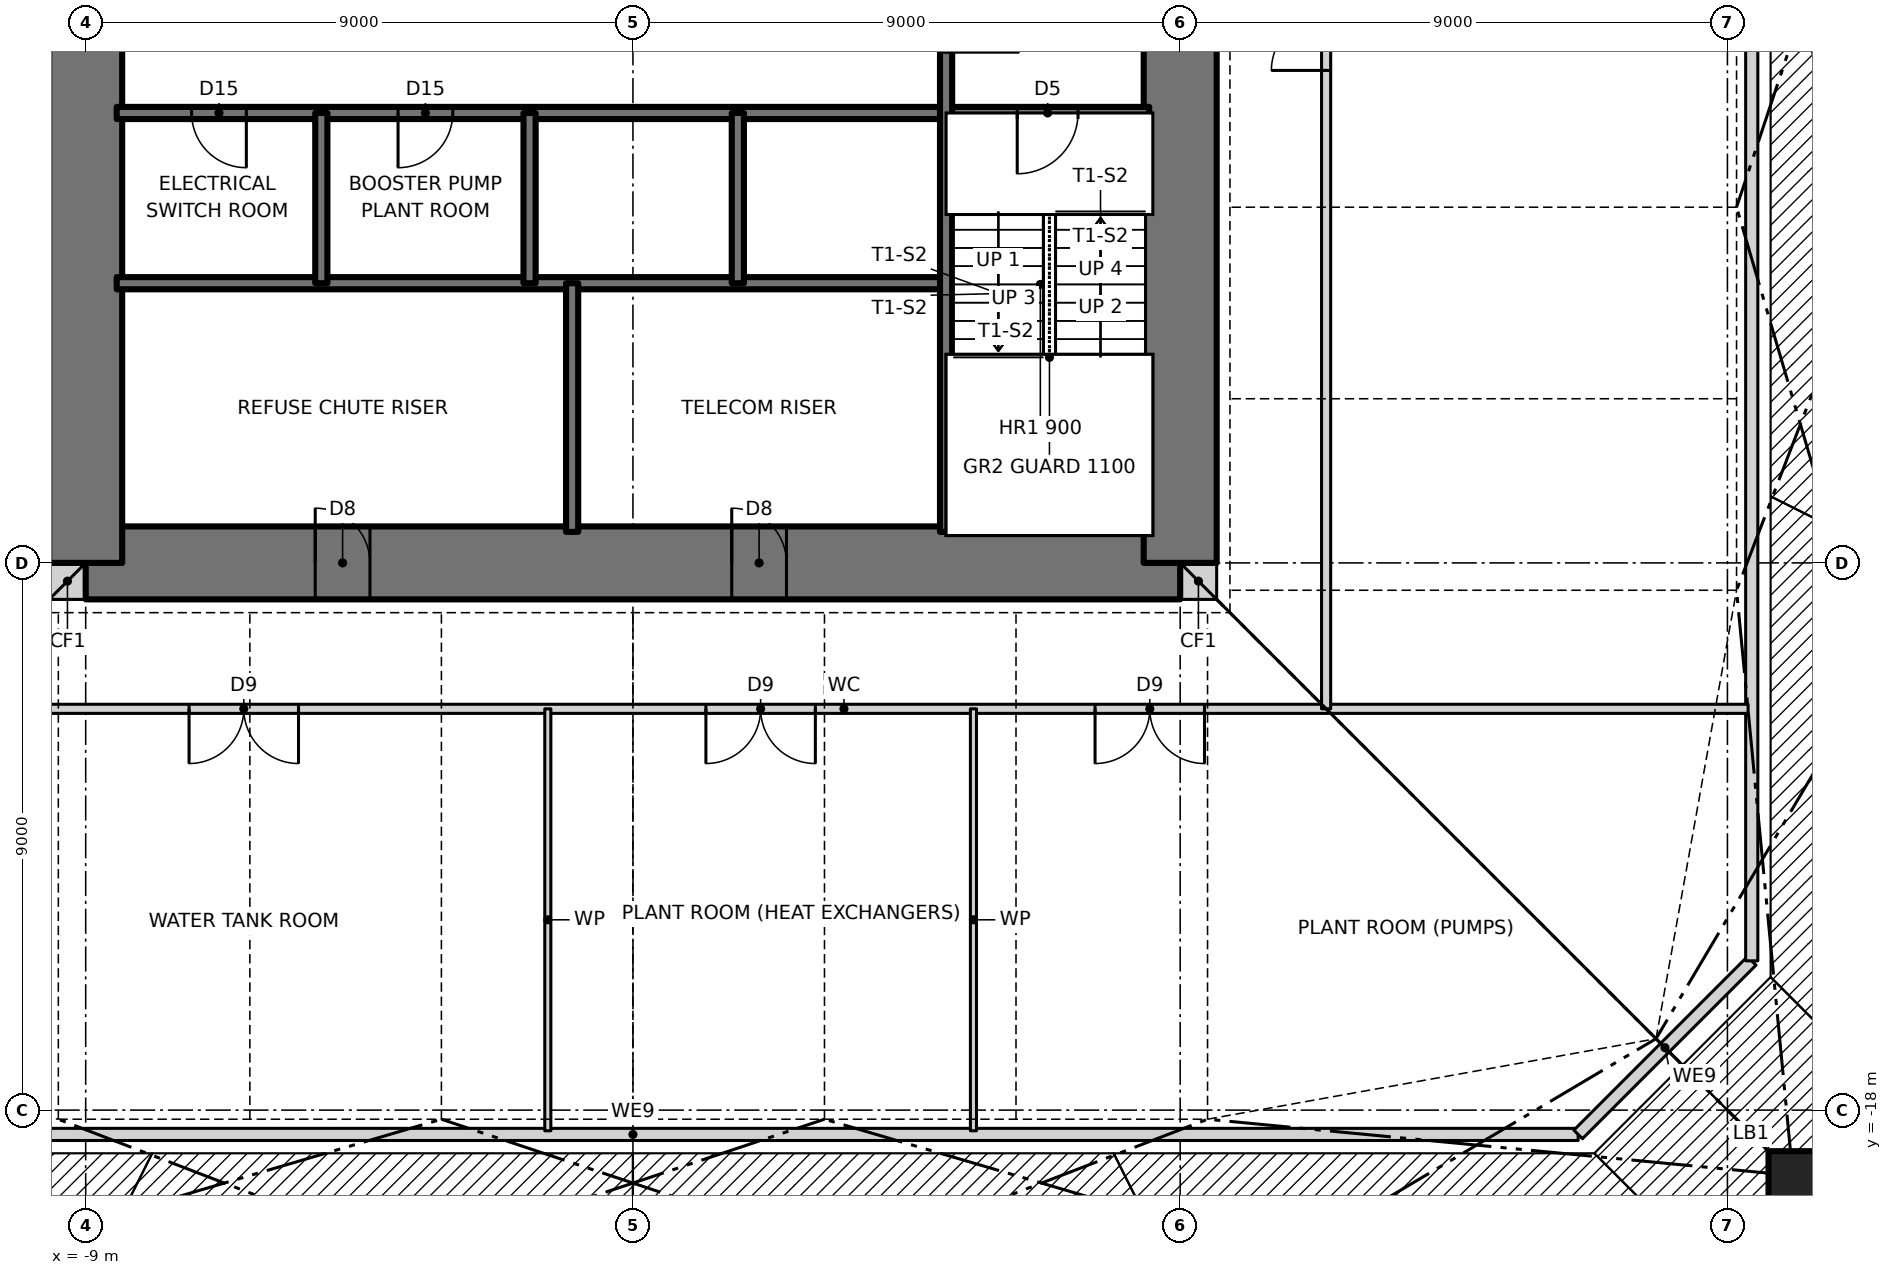
"""IFC4 building model, lengths in metres.
Left out: names, types, materials, properties, quantities, classifications, styles, units other than length and angle.
Written with IfcOpenShell. Run it as: python <this file> out.ifc"""

import sys

from ifc_helpers import new_model, si_unit, direction, frame, frame_2d, origin, origin_2d, place, context, subcontext, project, spatial, rectangle, hollow_rectangle, extrude, clip, halfspace, element, fill, save


model = new_model("IFC4")
c1 = context("Model", 3, precision=1e-05, world=origin(), true_north=direction((0.0, 1.0)))
c2 = subcontext(c1, "Body", "Model", "MODEL_VIEW")
j1 = project(units=[si_unit("LENGTHUNIT", "METRE"), si_unit("PLANEANGLEUNIT", "RADIAN")], contexts=[c1])
p1 = place(None, origin())
s1 = spatial("IfcSite", under=j1, at=p1, CompositionType="ELEMENT")
p2 = place(p1, origin())
s2 = spatial("IfcBuilding", under=s1, at=p2, CompositionType="ELEMENT")
p3 = place(p2, frame((0.0, 0.0, 143.5)))
s3 = spatial("IfcBuildingStorey", under=s2, at=p3, CompositionType="ELEMENT", Elevation=143.5)
p4 = place(p3, frame((-10.8, -20.4, 0.0), z_axis=(0.206163197348, 0.343580475001, 0.916214600002), x_axis=(-0.857476506072, 0.514523120505, 0.0)))
e1 = element("IfcColumn", 1, at=p4, inside=s3, PredefinedType="COLUMN", context=c2, shape_type="Clipping", body=[
    clip(clip(extrude(hollow_rectangle(XDim=0.8, YDim=0.8, WallThickness=0.07, at=origin_2d()), origin(), (0.0, 0.0, 1.0), 6.549), halfspace(frame((0.0, 0.0, 0.0), z_axis=(0.0, -0.400687916891, -0.916214600002), x_axis=(-0.857476506072, -0.471413595046, 0.206163197348)), False)), halfspace(frame((0.0, 2.404, 5.497), z_axis=(0.0, 0.400687916891, 0.916214600002), x_axis=(-0.857476506072, -0.471413595046, 0.206163197348)), False)),
])
p5 = place(p3, frame((-3.6, -20.4, 0.0), z_axis=(0.07008242466, 0.350260100688, 0.934026935168), x_axis=(-0.980564303347, 0.196197979098, 0.0)))
e2 = element("IfcColumn", 2, at=p5, inside=s3, PredefinedType="COLUMN", context=c2, shape_type="Clipping", body=[
    clip(clip(extrude(hollow_rectangle(XDim=0.8, YDim=0.8, WallThickness=0.07, at=origin_2d()), origin(), (0.0, 0.0, 1.0), 6.424), halfspace(frame((0.0, 0.0, 0.0), z_axis=(0.0, -0.35720258171, -0.934026935168), x_axis=(-0.980564303347, -0.183254197104, 0.07008242466)), False)), halfspace(frame((0.0, 2.143, 5.604), z_axis=(0.0, 0.35720258171, 0.934026935168), x_axis=(-0.980564303347, -0.183254197104, 0.07008242466)), False)),
])
p6 = place(p3, frame((3.6, -20.4, 0.0), z_axis=(-0.07008242466, 0.350260100688, 0.934026935168), x_axis=(-0.980564303347, -0.196197979098, 0.0)))
e3 = element("IfcColumn", 3, at=p6, inside=s3, PredefinedType="COLUMN", context=c2, shape_type="Clipping", body=[
    clip(clip(extrude(hollow_rectangle(XDim=0.8, YDim=0.8, WallThickness=0.07, at=origin_2d()), origin(), (0.0, 0.0, 1.0), 6.424), halfspace(frame((0.0, 0.0, 0.0), z_axis=(0.0, -0.35720258171, -0.934026935168), x_axis=(-0.980564303347, 0.183254197104, -0.07008242466)), False)), halfspace(frame((0.0, 2.143, 5.604), z_axis=(0.0, 0.35720258171, 0.934026935168), x_axis=(-0.980564303347, 0.183254197104, -0.07008242466)), False)),
])
p7 = place(p3, frame((10.8, -20.4, 0.0), z_axis=(-0.206163197348, 0.343580475001, 0.916214600002), x_axis=(-0.857476506072, -0.514523120505, 0.0)))
e4 = element("IfcColumn", 4, at=p7, inside=s3, PredefinedType="COLUMN", context=c2, shape_type="Clipping", body=[
    clip(clip(extrude(hollow_rectangle(XDim=0.8, YDim=0.8, WallThickness=0.07, at=origin_2d()), origin(), (0.0, 0.0, 1.0), 6.549), halfspace(frame((0.0, 0.0, 0.0), z_axis=(0.0, -0.400687916891, -0.916214600002), x_axis=(-0.857476506072, 0.471413595046, -0.206163197348)), False)), halfspace(frame((0.0, 2.404, 5.497), z_axis=(0.0, 0.400687916891, 0.916214600002), x_axis=(-0.857476506072, 0.471413595046, -0.206163197348)), False)),
])
p8 = place(p3, frame((19.076, -19.076, 0.0), z_axis=(-0.331294578225, 0.331294578225, 0.883452208599), x_axis=(-0.707106781187, -0.707106781187, 0.0)))
e5 = element("IfcColumn", 5, at=p8, inside=s3, PredefinedType="COLUMN", context=c2, shape_type="Clipping", body=[
    clip(clip(extrude(hollow_rectangle(XDim=0.8, YDim=0.8, WallThickness=0.18, at=origin_2d()), origin(), (0.0, 0.0, 1.0), 6.792), halfspace(frame((0.0, 0.0, 0.0), z_axis=(0.0, -0.468521285666, -0.883452208599), x_axis=(-0.707106781187, 0.624695047554, -0.331294578225)), False)), halfspace(frame((0.0, 2.811, 5.301), z_axis=(0.0, 0.468521285666, 0.883452208599), x_axis=(-0.707106781187, 0.624695047554, -0.331294578225)), False)),
])
p9 = place(p3, frame((20.4, -10.8, 0.0), z_axis=(-0.343580475001, 0.206163197348, 0.916214600002), x_axis=(-0.514523120505, -0.857476506072, 0.0)))
e6 = element("IfcColumn", 6, at=p9, inside=s3, PredefinedType="COLUMN", context=c2, shape_type="Clipping", body=[
    clip(clip(extrude(hollow_rectangle(XDim=0.8, YDim=0.8, WallThickness=0.07, at=origin_2d()), origin(), (0.0, 0.0, 1.0), 6.549), halfspace(frame((0.0, 0.0, 0.0), z_axis=(0.0, -0.400687916891, -0.916214600002), x_axis=(-0.514523120505, 0.785632494022, -0.343580475001)), False)), halfspace(frame((0.0, 2.404, 5.497), z_axis=(0.0, 0.400687916891, 0.916214600002), x_axis=(-0.514523120505, 0.785632494022, -0.343580475001)), False)),
])
p10 = place(p3, frame((20.4, -3.6, 0.0), z_axis=(-0.350260100688, 0.07008242466, 0.934026935168), x_axis=(-0.196197979098, -0.980564303347, 0.0)))
e7 = element("IfcColumn", 7, at=p10, inside=s3, PredefinedType="COLUMN", context=c2, shape_type="Clipping", body=[
    clip(clip(extrude(hollow_rectangle(XDim=0.8, YDim=0.8, WallThickness=0.07, at=origin_2d()), origin(), (0.0, 0.0, 1.0), 6.424), halfspace(frame((0.0, 0.0, 0.0), z_axis=(0.0, -0.35720258171, -0.934026935168), x_axis=(-0.196197979098, 0.91587347099, -0.350260100688)), False)), halfspace(frame((0.0, 2.143, 5.604), z_axis=(0.0, 0.35720258171, 0.934026935168), x_axis=(-0.196197979098, 0.91587347099, -0.350260100688)), False)),
])
for number, where, z_axis, x_axis in (
    (8, (-9.6, -9.3, 0.0), (0.0, 0.0, 1.0), (1.0, 0.0, 0.0)),
    (9, (9.0, -9.3, 0.0), (0.0, 0.0, 1.0), (1.0, 0.0, 0.0)),
):
    element("IfcWall", number, at=place(p3, frame(where, z_axis=z_axis, x_axis=x_axis)), inside=s3, PredefinedType="SOLIDWALL", context=c2, shape_type="SweptSolid", body=[
        extrude(rectangle(XDim=0.6, YDim=0.6, at=frame_2d((0.3, 0.0))), origin(), (0.0, 0.0, 1.0), 6.0),
    ])
p11 = place(p3, frame((-9.0, -9.0, 0.0), z_axis=(0.0, 0.0, 1.0), x_axis=(1.0, 0.0, 0.0)))
e10 = element("IfcWall", 10, at=p11, inside=s3, PredefinedType="SHEAR", context=c2, shape_type="SweptSolid", body=[
    extrude(rectangle(XDim=18.0, YDim=1.2, at=frame_2d((9.0, 0.0))), origin(), (0.0, 0.0, 1.0), 6.0),
])
p12 = place(p11, frame((3.775, 0.0, 0.0)))
e11 = element("IfcOpeningElement", 11, at=p12, cuts=e10, PredefinedType="OPENING", context=c2, shape_type="SweptSolid", body=[
    extrude(rectangle(XDim=0.9, YDim=2.1, at=frame_2d((0.45, 1.05))), frame((0.0, 0.61, 0.0), z_axis=(0.0, -1.0, 0.0), x_axis=(1.0, 0.0, 0.0)), (0.0, 0.0, 1.0), 1.22),
])
p13 = place(p11, frame((10.625, 0.0, 0.0)))
e12 = element("IfcOpeningElement", 12, at=p13, cuts=e10, PredefinedType="OPENING", context=c2, shape_type="SweptSolid", body=[
    extrude(rectangle(XDim=0.9, YDim=2.1, at=frame_2d((0.45, 1.05))), frame((0.0, 0.61, 0.0), z_axis=(0.0, -1.0, 0.0), x_axis=(1.0, 0.0, 0.0)), (0.0, 0.0, 1.0), 1.22),
])
p14 = place(p3, frame((9.0, -9.0, 0.0), z_axis=(0.0, 0.0, 1.0), x_axis=(0.0, 1.0, 0.0)))
e13 = element("IfcWall", 13, at=p14, inside=s3, PredefinedType="SHEAR", context=c2, shape_type="SweptSolid", body=[
    extrude(rectangle(XDim=18.0, YDim=1.2, at=frame_2d((9.0, 0.0))), origin(), (0.0, 0.0, 1.0), 6.0),
])
p15 = place(p14, frame((8.5, 0.0, 0.0)))
e14 = element("IfcOpeningElement", 14, at=p15, cuts=e13, PredefinedType="OPENING", context=c2, shape_type="SweptSolid", body=[
    extrude(rectangle(XDim=1.0, YDim=2.1, at=frame_2d((0.5, 1.05))), frame((0.0, 0.61, 0.0), z_axis=(0.0, -1.0, 0.0), x_axis=(1.0, 0.0, 0.0)), (0.0, 0.0, 1.0), 1.22),
])
p16 = place(p3, frame((-9.0, 9.0, 0.0), z_axis=(0.0, 0.0, 1.0), x_axis=(0.0, -1.0, 0.0)))
e15 = element("IfcWall", 15, at=p16, inside=s3, PredefinedType="SHEAR", context=c2, shape_type="SweptSolid", body=[
    extrude(rectangle(XDim=18.0, YDim=1.2, at=frame_2d((9.0, 0.0))), origin(), (0.0, 0.0, 1.0), 6.0),
])
p17 = place(p16, frame((8.5, 0.0, 0.0)))
e16 = element("IfcOpeningElement", 16, at=p17, cuts=e15, PredefinedType="OPENING", context=c2, shape_type="SweptSolid", body=[
    extrude(rectangle(XDim=1.0, YDim=2.1, at=frame_2d((0.5, 1.05))), frame((0.0, 0.61, 0.0), z_axis=(0.0, -1.0, 0.0), x_axis=(1.0, 0.0, 0.0)), (0.0, 0.0, 1.0), 1.22),
])
p18 = place(p3, frame((-15.545, -18.4, 0.0), z_axis=(0.0, 0.0, 1.0), x_axis=(1.0, 0.0, 0.0)))
e17 = element("IfcWall", 17, at=p18, inside=s3, PredefinedType="PARTITIONING", context=c2, shape_type="SweptSolid", body=[
    extrude(rectangle(XDim=31.09, YDim=0.2, at=frame_2d((15.545, 0.0))), origin(), (0.0, 0.0, 1.0), 5.7),
])
p19 = place(p3, frame((15.545, -18.4, 0.0), z_axis=(0.0, 0.0, 1.0), x_axis=(0.707106781187, 0.707106781187, 0.0)))
e18 = element("IfcWall", 18, at=p19, inside=s3, PredefinedType="PARTITIONING", context=c2, shape_type="SweptSolid", body=[
    extrude(rectangle(XDim=4.038, YDim=0.2, at=frame_2d((2.019, 0.0))), origin(), (0.0, 0.0, 1.0), 5.7),
])
p20 = place(p3, frame((18.4, -15.545, 0.0), z_axis=(0.0, 0.0, 1.0), x_axis=(0.0, 1.0, 0.0)))
e19 = element("IfcWall", 19, at=p20, inside=s3, PredefinedType="PARTITIONING", context=c2, shape_type="SweptSolid", body=[
    extrude(rectangle(XDim=31.09, YDim=0.2, at=frame_2d((15.545, 0.0))), origin(), (0.0, 0.0, 1.0), 5.7),
])
p21 = place(p3, frame((-11.4, -11.4, 0.0), z_axis=(0.0, 0.0, 1.0), x_axis=(1.0, 0.0, 0.0)))
e20 = element("IfcWall", 20, at=p21, inside=s3, PredefinedType="PARTITIONING", context=c2, shape_type="SweptSolid", body=[
    extrude(rectangle(XDim=29.74, YDim=0.15, at=frame_2d((14.87, 0.0))), origin(), (0.0, 0.0, 1.0), 5.77),
])
p22 = place(p21, frame((4.1, 0.0, 0.0)))
e21 = element("IfcOpeningElement", 21, at=p22, cuts=e20, PredefinedType="OPENING", context=c2, shape_type="SweptSolid", body=[
    extrude(rectangle(XDim=1.8, YDim=2.1, at=frame_2d((0.9, 1.05))), frame((0.0, 0.085, 0.0), z_axis=(0.0, -1.0, 0.0), x_axis=(1.0, 0.0, 0.0)), (0.0, 0.0, 1.0), 0.17),
])
p23 = place(p21, frame((12.6, 0.0, 0.0)))
e22 = element("IfcOpeningElement", 22, at=p23, cuts=e20, PredefinedType="OPENING", context=c2, shape_type="SweptSolid", body=[
    extrude(rectangle(XDim=1.8, YDim=2.1, at=frame_2d((0.9, 1.05))), frame((0.0, 0.085, 0.0), z_axis=(0.0, -1.0, 0.0), x_axis=(1.0, 0.0, 0.0)), (0.0, 0.0, 1.0), 0.17),
])
p24 = place(p21, frame((19.0, 0.0, 0.0)))
e23 = element("IfcOpeningElement", 23, at=p24, cuts=e20, PredefinedType="OPENING", context=c2, shape_type="SweptSolid", body=[
    extrude(rectangle(XDim=1.8, YDim=2.1, at=frame_2d((0.9, 1.05))), frame((0.0, 0.085, 0.0), z_axis=(0.0, -1.0, 0.0), x_axis=(1.0, 0.0, 0.0)), (0.0, 0.0, 1.0), 0.17),
])
p25 = place(p3, frame((-8.49, -4.4, 0.0), z_axis=(0.0, 0.0, 1.0), x_axis=(1.0, 0.0, 0.0)))
e24 = element("IfcWall", 24, at=p25, inside=s3, PredefinedType="SOLIDWALL", context=c2, shape_type="SweptSolid", body=[
    extrude(rectangle(XDim=13.64, YDim=0.2, at=frame_2d((6.82, 0.0))), origin(), (0.0, 0.0, 1.0), 6.0),
])
p26 = place(p3, frame((-8.49, -1.6, 0.0), z_axis=(0.0, 0.0, 1.0), x_axis=(1.0, 0.0, 0.0)))
e25 = element("IfcWall", 25, at=p26, inside=s3, PredefinedType="SOLIDWALL", context=c2, shape_type="SweptSolid", body=[
    extrude(rectangle(XDim=16.98, YDim=0.2, at=frame_2d((8.49, 0.0))), origin(), (0.0, 0.0, 1.0), 6.0),
])
p27 = place(p26, frame((14.81, 0.0, 0.0)))
e26 = element("IfcOpeningElement", 26, at=p27, cuts=e25, PredefinedType="OPENING", context=c2, shape_type="SweptSolid", body=[
    extrude(rectangle(XDim=1.0, YDim=2.1, at=frame_2d((0.5, 1.05))), frame((0.0, 0.11, 0.0), z_axis=(0.0, -1.0, 0.0), x_axis=(1.0, 0.0, 0.0)), (0.0, 0.0, 1.0), 0.22),
])
p28 = place(p26, frame((1.232, 0.0, 0.0)))
e27 = element("IfcOpeningElement", 27, at=p28, cuts=e25, PredefinedType="OPENING", context=c2, shape_type="SweptSolid", body=[
    extrude(rectangle(XDim=0.9, YDim=2.1, at=frame_2d((0.45, 1.05))), frame((0.0, 0.11, 0.0), z_axis=(0.0, -1.0, 0.0), x_axis=(1.0, 0.0, 0.0)), (0.0, 0.0, 1.0), 0.22),
])
p29 = place(p26, frame((4.627, 0.0, 0.0)))
e28 = element("IfcOpeningElement", 28, at=p29, cuts=e25, PredefinedType="OPENING", context=c2, shape_type="SweptSolid", body=[
    extrude(rectangle(XDim=0.9, YDim=2.1, at=frame_2d((0.45, 1.05))), frame((0.0, 0.11, 0.0), z_axis=(0.0, -1.0, 0.0), x_axis=(1.0, 0.0, 0.0)), (0.0, 0.0, 1.0), 0.22),
])
p30 = place(p3, frame((11.4, -11.4, 0.0), z_axis=(0.0, 0.0, 1.0), x_axis=(0.0, 1.0, 0.0)))
e29 = element("IfcWall", 29, at=p30, inside=s3, PredefinedType="PARTITIONING", context=c2, shape_type="SweptSolid", body=[
    extrude(rectangle(XDim=29.74, YDim=0.15, at=frame_2d((14.87, 0.0))), origin(), (0.0, 0.0, 1.0), 5.77),
])
p31 = place(p30, frame((10.5, 0.0, 0.0)))
e30 = element("IfcOpeningElement", 30, at=p31, cuts=e29, PredefinedType="OPENING", context=c2, shape_type="SweptSolid", body=[
    extrude(rectangle(XDim=1.8, YDim=2.1, at=frame_2d((0.9, 1.05))), frame((0.0, 0.085, 0.0), z_axis=(0.0, -1.0, 0.0), x_axis=(1.0, 0.0, 0.0)), (0.0, 0.0, 1.0), 0.17),
])
p32 = place(p3, frame((5.6, -18.34, 0.0), z_axis=(0.0, 0.0, 1.0), x_axis=(0.0, 1.0, 0.0)))
e31 = element("IfcWall", 31, at=p32, inside=s3, PredefinedType="PARTITIONING", context=c2, shape_type="SweptSolid", body=[
    extrude(rectangle(XDim=6.94, YDim=0.1, at=frame_2d((3.47, 0.0))), origin(), (0.0, 0.0, 1.0), 5.77),
])
p33 = place(p3, frame((5.15, -8.49, 0.0), z_axis=(0.0, 0.0, 1.0), x_axis=(0.0, 1.0, 0.0)))
e32 = element("IfcWall", 32, at=p33, inside=s3, PredefinedType="SOLIDWALL", context=c2, shape_type="SweptSolid", body=[
    extrude(rectangle(XDim=13.09, YDim=0.2, at=frame_2d((6.545, 0.0))), origin(), (0.0, 0.0, 1.0), 6.0),
])
p34 = place(p33, frame((7.89, 0.0, 0.0)))
e33 = element("IfcOpeningElement", 33, at=p34, cuts=e32, PredefinedType="OPENING", context=c2, shape_type="SweptSolid", body=[
    extrude(rectangle(XDim=1.2, YDim=2.1, at=frame_2d((0.6, 1.05))), frame((0.0, 0.11, 0.0), z_axis=(0.0, -1.0, 0.0), x_axis=(1.0, 0.0, 0.0)), (0.0, 0.0, 1.0), 0.22),
])
p35 = place(p3, frame((1.725, -4.4, 0.0), z_axis=(0.0, 0.0, 1.0), x_axis=(0.0, 1.0, 0.0)))
e34 = element("IfcWall", 34, at=p35, inside=s3, PredefinedType="SOLIDWALL", context=c2, shape_type="SweptSolid", body=[
    extrude(rectangle(XDim=2.8, YDim=0.2, at=frame_2d((1.4, 0.0))), origin(), (0.0, 0.0, 1.0), 6.0),
])
p36 = place(p3, frame((-1.0, -8.49, 0.0), z_axis=(0.0, 0.0, 1.0), x_axis=(0.0, 1.0, 0.0)))
e35 = element("IfcWall", 35, at=p36, inside=s3, PredefinedType="SOLIDWALL", context=c2, shape_type="SweptSolid", body=[
    extrude(rectangle(XDim=4.09, YDim=0.2, at=frame_2d((2.045, 0.0))), origin(), (0.0, 0.0, 1.0), 6.0),
])
p37 = place(p3, frame((-1.4, -18.34, 0.0), z_axis=(0.0, 0.0, 1.0), x_axis=(0.0, 1.0, 0.0)))
e36 = element("IfcWall", 36, at=p37, inside=s3, PredefinedType="PARTITIONING", context=c2, shape_type="SweptSolid", body=[
    extrude(rectangle(XDim=6.94, YDim=0.1, at=frame_2d((3.47, 0.0))), origin(), (0.0, 0.0, 1.0), 5.77),
])
for number, where, z_axis, x_axis in (
    (37, (-1.7, -4.4, 0.0), (0.0, 0.0, 1.0), (0.0, 1.0, 0.0)),
    (38, (-5.125, -4.4, 0.0), (0.0, 0.0, 1.0), (0.0, 1.0, 0.0)),
):
    element("IfcWall", number, at=place(p3, frame(where, z_axis=z_axis, x_axis=x_axis)), inside=s3, PredefinedType="SOLIDWALL", context=c2, shape_type="SweptSolid", body=[
        extrude(rectangle(XDim=2.8, YDim=0.2, at=frame_2d((1.4, 0.0))), origin(), (0.0, 0.0, 1.0), 6.0),
    ])
p38 = place(p27, frame((1.0, 0.0, 0.0), z_axis=(0.0, 0.0, 1.0), x_axis=(-1.0, 0.0, 0.0)))
e39 = element("IfcDoor", 39, at=p38, inside=s3, OperationType="SINGLE_SWING_RIGHT", PredefinedType="DOOR", context=c2, shape_type="SweptSolid", body=[
    extrude(rectangle(XDim=1.0, YDim=2.1, at=frame_2d((0.5, 1.05))), frame((0.0, 0.025, 0.0), z_axis=(0.0, -1.0, 0.0), x_axis=(1.0, 0.0, 0.0)), (0.0, 0.0, 1.0), 0.05),
])
fill(e26, e39)
p39 = place(p34, frame((1.2, 0.0, 0.0), z_axis=(0.0, 0.0, 1.0), x_axis=(-1.0, 0.0, 0.0)))
e40 = element("IfcDoor", 40, at=p39, inside=s3, OperationType="SINGLE_SWING_RIGHT", PredefinedType="DOOR", context=c2, shape_type="SweptSolid", body=[
    extrude(rectangle(XDim=1.2, YDim=2.1, at=frame_2d((0.6, 1.05))), frame((0.0, 0.025, 0.0), z_axis=(0.0, -1.0, 0.0), x_axis=(1.0, 0.0, 0.0)), (0.0, 0.0, 1.0), 0.05),
])
fill(e33, e40)
p40 = place(p28, frame((0.9, 0.0, 0.0), z_axis=(0.0, 0.0, 1.0), x_axis=(-1.0, 0.0, 0.0)))
e41 = element("IfcDoor", 41, at=p40, inside=s3, OperationType="SINGLE_SWING_LEFT", PredefinedType="DOOR", context=c2, shape_type="SweptSolid", body=[
    extrude(rectangle(XDim=0.9, YDim=2.1, at=frame_2d((0.45, 1.05))), frame((0.0, 0.025, 0.0), z_axis=(0.0, -1.0, 0.0), x_axis=(1.0, 0.0, 0.0)), (0.0, 0.0, 1.0), 0.05),
])
fill(e27, e41)
p41 = place(p29, frame((0.9, 0.0, 0.0), z_axis=(0.0, 0.0, 1.0), x_axis=(-1.0, 0.0, 0.0)))
e42 = element("IfcDoor", 42, at=p41, inside=s3, OperationType="SINGLE_SWING_RIGHT", PredefinedType="DOOR", context=c2, shape_type="SweptSolid", body=[
    extrude(rectangle(XDim=0.9, YDim=2.1, at=frame_2d((0.45, 1.05))), frame((0.0, 0.025, 0.0), z_axis=(0.0, -1.0, 0.0), x_axis=(1.0, 0.0, 0.0)), (0.0, 0.0, 1.0), 0.05),
])
fill(e28, e42)
p42 = place(p22, frame((1.8, 0.0, 0.0), z_axis=(0.0, 0.0, 1.0), x_axis=(-1.0, 0.0, 0.0)))
e43 = element("IfcDoor", 43, at=p42, inside=s3, OperationType="DOUBLE_DOOR_SINGLE_SWING", PredefinedType="DOOR", context=c2, shape_type="SweptSolid", body=[
    extrude(rectangle(XDim=1.8, YDim=2.1, at=frame_2d((0.9, 1.05))), frame((0.0, 0.025, 0.0), z_axis=(0.0, -1.0, 0.0), x_axis=(1.0, 0.0, 0.0)), (0.0, 0.0, 1.0), 0.05),
])
fill(e21, e43)
p43 = place(p23, frame((1.8, 0.0, 0.0), z_axis=(0.0, 0.0, 1.0), x_axis=(-1.0, 0.0, 0.0)))
e44 = element("IfcDoor", 44, at=p43, inside=s3, OperationType="DOUBLE_DOOR_SINGLE_SWING", PredefinedType="DOOR", context=c2, shape_type="SweptSolid", body=[
    extrude(rectangle(XDim=1.8, YDim=2.1, at=frame_2d((0.9, 1.05))), frame((0.0, 0.025, 0.0), z_axis=(0.0, -1.0, 0.0), x_axis=(1.0, 0.0, 0.0)), (0.0, 0.0, 1.0), 0.05),
])
fill(e22, e44)
p44 = place(p24, frame((1.8, 0.0, 0.0), z_axis=(0.0, 0.0, 1.0), x_axis=(-1.0, 0.0, 0.0)))
e45 = element("IfcDoor", 45, at=p44, inside=s3, OperationType="DOUBLE_DOOR_SINGLE_SWING", PredefinedType="DOOR", context=c2, shape_type="SweptSolid", body=[
    extrude(rectangle(XDim=1.8, YDim=2.1, at=frame_2d((0.9, 1.05))), frame((0.0, 0.025, 0.0), z_axis=(0.0, -1.0, 0.0), x_axis=(1.0, 0.0, 0.0)), (0.0, 0.0, 1.0), 0.05),
])
fill(e23, e45)
p45 = place(p31, origin())
e46 = element("IfcDoor", 46, at=p45, inside=s3, OperationType="DOUBLE_DOOR_SINGLE_SWING", PredefinedType="DOOR", context=c2, shape_type="SweptSolid", body=[
    extrude(rectangle(XDim=1.8, YDim=2.1, at=frame_2d((0.9, 1.05))), frame((0.0, 0.025, 0.0), z_axis=(0.0, -1.0, 0.0), x_axis=(1.0, 0.0, 0.0)), (0.0, 0.0, 1.0), 0.05),
])
fill(e30, e46)
p46 = place(p12, origin())
e47 = element("IfcDoor", 47, at=p46, inside=s3, OperationType="SINGLE_SWING_LEFT", PredefinedType="DOOR", context=c2, shape_type="SweptSolid", body=[
    extrude(rectangle(XDim=0.9, YDim=2.1, at=frame_2d((0.45, 1.05))), frame((0.0, 0.025, 0.0), z_axis=(0.0, -1.0, 0.0), x_axis=(1.0, 0.0, 0.0)), (0.0, 0.0, 1.0), 0.05),
])
fill(e11, e47)
p47 = place(p13, origin())
e48 = element("IfcDoor", 48, at=p47, inside=s3, OperationType="SINGLE_SWING_LEFT", PredefinedType="DOOR", context=c2, shape_type="SweptSolid", body=[
    extrude(rectangle(XDim=0.9, YDim=2.1, at=frame_2d((0.45, 1.05))), frame((0.0, 0.025, 0.0), z_axis=(0.0, -1.0, 0.0), x_axis=(1.0, 0.0, 0.0)), (0.0, 0.0, 1.0), 0.05),
])
fill(e12, e48)
save(model, sys.argv[1])
